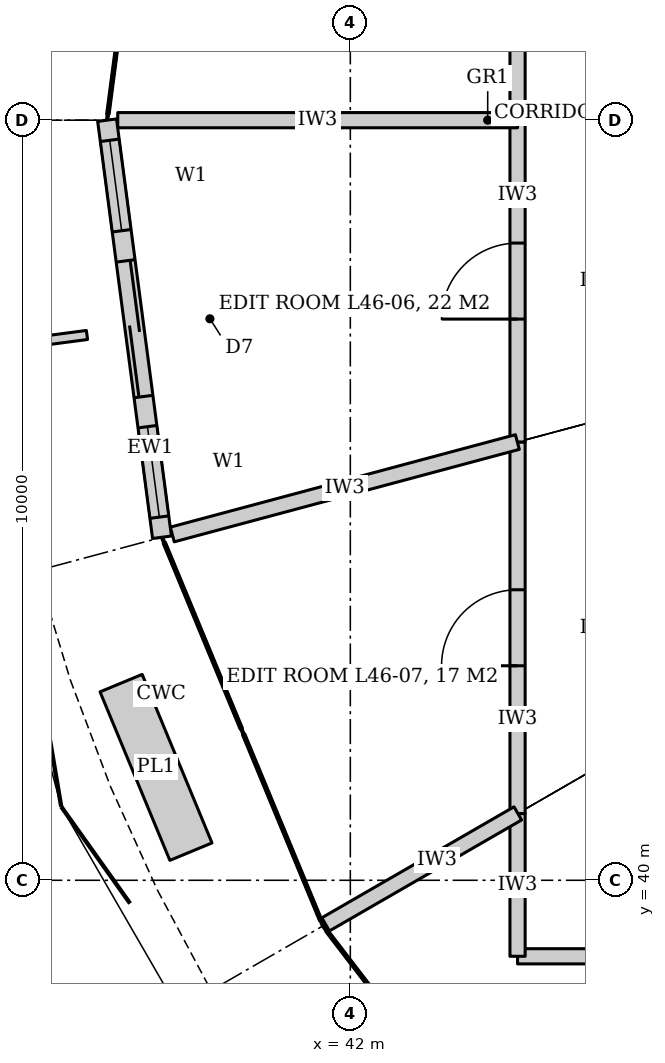
"""IFC4 building model, lengths in metres.
Left out: names, types, materials, properties, quantities, classifications, styles, units other than length and angle.
Written with IfcOpenShell. Run it as: python <this file> out.ifc"""

import sys

from ifc_helpers import new_model, si_unit, direction, frame, frame_2d, origin, place, context, subcontext, project, spatial, rectangle, extrude, element, fill, save


model = new_model("IFC4")
c1 = context("Model", 3, precision=1e-05, world=origin(), true_north=direction((0.0, 1.0)))
c2 = subcontext(c1, "Body", "Model", "MODEL_VIEW")
j1 = project(units=[si_unit("LENGTHUNIT", "METRE"), si_unit("PLANEANGLEUNIT", "RADIAN")], contexts=[c1])
p1 = place(None, origin())
s1 = spatial("IfcSite", under=j1, at=p1, CompositionType="ELEMENT")
p2 = place(p1, origin())
s2 = spatial("IfcBuilding", under=s1, at=p2, CompositionType="ELEMENT")
p3 = place(p2, frame((0.0, 0.0, 202.4)))
s3 = spatial("IfcBuildingStorey", under=s2, at=p3, CompositionType="ELEMENT", Elevation=202.4)
p4 = place(p3, frame((47.0, 39.0, 0.0), z_axis=(0.0, 0.0, 1.0), x_axis=(-1.0, 0.0, 0.0)))
e1 = element("IfcWall", 1, at=p4, inside=s3, PredefinedType="PARTITIONING", context=c2, shape_type="SweptSolid", body=[
    extrude(rectangle(XDim=2.8, YDim=0.2, at=frame_2d((1.4, 0.0))), origin(), (0.0, 0.0, 1.0), 3.04),
])
p5 = place(p3, frame((44.2, 39.0, 0.0), z_axis=(0.0, 0.0, 1.0), x_axis=(0.0, 1.0, 0.0)))
e2 = element("IfcWall", 2, at=p5, inside=s3, PredefinedType="PARTITIONING", context=c2, shape_type="SweptSolid", body=[
    extrude(rectangle(XDim=1.878, YDim=0.2, at=frame_2d((0.939, 0.0))), origin(), (0.0, 0.0, 1.0), 3.012),
])
p6 = place(p3, frame((44.2, 40.878, 0.0), z_axis=(0.0, 0.0, 1.0), x_axis=(0.0, 1.0, 0.0)))
e3 = element("IfcWall", 3, at=p6, inside=s3, PredefinedType="PARTITIONING", context=c2, shape_type="SweptSolid", body=[
    extrude(rectangle(XDim=4.888, YDim=0.2, at=frame_2d((2.444, 0.0))), origin(), (0.0, 0.0, 1.0), 3.012),
])
p7 = place(p6, frame((1.944, 0.0, 0.0)))
e4 = element("IfcOpeningElement", 4, at=p7, cuts=e3, PredefinedType="OPENING", context=c2, shape_type="SweptSolid", body=[
    extrude(rectangle(XDim=1.0, YDim=2.1, at=frame_2d((0.5, 1.05))), frame((0.0, 0.11, 0.0), z_axis=(0.0, -1.0, 0.0), x_axis=(1.0, 0.0, 0.0)), (0.0, 0.0, 1.0), 0.22),
])
p8 = place(p3, frame((44.2, 45.766, 0.0), z_axis=(0.0, 0.0, 1.0), x_axis=(0.0, 1.0, 0.0)))
e5 = element("IfcWall", 5, at=p8, inside=s3, PredefinedType="PARTITIONING", context=c2, shape_type="SweptSolid", body=[
    extrude(rectangle(XDim=4.234, YDim=0.2, at=frame_2d((2.117, 0.0))), origin(), (0.0, 0.0, 1.0), 3.012),
])
p9 = place(p8, frame((1.617, 0.0, 0.0)))
e6 = element("IfcOpeningElement", 6, at=p9, cuts=e5, PredefinedType="OPENING", context=c2, shape_type="SweptSolid", body=[
    extrude(rectangle(XDim=1.0, YDim=2.1, at=frame_2d((0.5, 1.05))), frame((0.0, 0.11, 0.0), z_axis=(0.0, -1.0, 0.0), x_axis=(1.0, 0.0, 0.0)), (0.0, 0.0, 1.0), 0.22),
])
p10 = place(p3, frame((44.2, 50.0, 0.0), z_axis=(0.0, 0.0, 1.0), x_axis=(0.0, 1.0, 0.0)))
e7 = element("IfcWall", 7, at=p10, inside=s3, PredefinedType="PARTITIONING", context=c2, shape_type="SweptSolid", body=[
    extrude(rectangle(XDim=4.234, YDim=0.2, at=frame_2d((2.117, 0.0))), origin(), (0.0, 0.0, 1.0), 3.012),
])
p11 = place(p10, frame((1.617, 0.0, 0.0)))
e8 = element("IfcOpeningElement", 8, at=p11, cuts=e7, PredefinedType="OPENING", context=c2, shape_type="SweptSolid", body=[
    extrude(rectangle(XDim=1.0, YDim=2.1, at=frame_2d((0.5, 1.05))), frame((0.0, 0.11, 0.0), z_axis=(0.0, -1.0, 0.0), x_axis=(1.0, 0.0, 0.0)), (0.0, 0.0, 1.0), 0.22),
])
p12 = place(p3, frame((44.2, 50.0, 0.0), z_axis=(0.0, 0.0, 1.0), x_axis=(-1.0, 0.0, 0.0)))
e9 = element("IfcWall", 9, at=p12, inside=s3, PredefinedType="PARTITIONING", context=c2, shape_type="SweptSolid", body=[
    extrude(rectangle(XDim=5.26, YDim=0.2, at=frame_2d((2.63, 0.0))), origin(), (0.0, 0.0, 1.0), 3.012),
])
p13 = place(p3, frame((44.198, 45.766, 0.0), z_axis=(0.0, 0.0, 1.0), x_axis=(-0.96593251702, -0.258794073665, 0.0)))
e10 = element("IfcWall", 10, at=p13, inside=s3, PredefinedType="PARTITIONING", context=c2, shape_type="SweptSolid", body=[
    extrude(rectangle(XDim=4.7, YDim=0.2, at=frame_2d((2.35, 0.0))), origin(), (0.0, 0.0, 1.0), 3.012),
])
p14 = place(p3, frame((44.204, 40.88, 0.0), z_axis=(0.0, 0.0, 1.0), x_axis=(-0.866032430508, -0.49998782916, 0.0)))
e11 = element("IfcWall", 11, at=p14, inside=s3, PredefinedType="PARTITIONING", context=c2, shape_type="SweptSolid", body=[
    extrude(rectangle(XDim=2.92, YDim=0.2, at=frame_2d((1.46, 0.0))), origin(), (0.0, 0.0, 1.0), 3.012),
])
p15 = place(p3, frame((38.8, 50.0, 0.0), z_axis=(0.0, 0.0, 1.0), x_axis=(0.130530967061, -0.991444232742, 0.0)))
e12 = element("IfcWall", 12, at=p15, inside=s3, PredefinedType="SOLIDWALL", context=c2, shape_type="SweptSolid", body=[
    extrude(rectangle(XDim=5.534, YDim=0.25, at=frame_2d((2.767, 0.0))), origin(), (0.0, 0.0, 1.0), 4.04),
])
p16 = place(p15, frame((1.867, 0.0, 0.0)))
e13 = element("IfcOpeningElement", 13, at=p16, cuts=e12, PredefinedType="OPENING", context=c2, shape_type="SweptSolid", body=[
    extrude(rectangle(XDim=1.8, YDim=2.4, at=frame_2d((0.9, 1.2))), frame((0.0, 0.135, 0.0), z_axis=(0.0, -1.0, 0.0), x_axis=(1.0, 0.0, 0.0)), (0.0, 0.0, 1.0), 0.27),
])
p17 = place(p15, frame((0.267, 0.0, 0.0)))
e14 = element("IfcOpeningElement", 14, at=p17, cuts=e12, PredefinedType="OPENING", context=c2, shape_type="SweptSolid", body=[
    extrude(rectangle(XDim=1.2, YDim=2.4, at=frame_2d((0.6, 1.2))), frame((0.0, 0.135, 0.0), z_axis=(0.0, -1.0, 0.0), x_axis=(1.0, 0.0, 0.0)), (0.0, 0.0, 1.0), 0.27),
])
p18 = place(p15, frame((4.067, 0.0, 0.0)))
e15 = element("IfcOpeningElement", 15, at=p18, cuts=e12, PredefinedType="OPENING", context=c2, shape_type="SweptSolid", body=[
    extrude(rectangle(XDim=1.2, YDim=2.4, at=frame_2d((0.6, 1.2))), frame((0.0, 0.135, 0.0), z_axis=(0.0, -1.0, 0.0), x_axis=(1.0, 0.0, 0.0)), (0.0, 0.0, 1.0), 0.27),
])
p19 = place(p9, origin())
e16 = element("IfcDoor", 16, at=p19, inside=s3, OperationType="SINGLE_SWING_LEFT", PredefinedType="DOOR", context=c2, shape_type="SweptSolid", body=[
    extrude(rectangle(XDim=1.0, YDim=2.1, at=frame_2d((0.5, 1.05))), frame((0.0, 0.025, 0.0), z_axis=(0.0, -1.0, 0.0), x_axis=(1.0, 0.0, 0.0)), (0.0, 0.0, 1.0), 0.05),
])
fill(e6, e16)
p20 = place(p7, origin())
e17 = element("IfcDoor", 17, at=p20, inside=s3, OperationType="SINGLE_SWING_LEFT", PredefinedType="DOOR", context=c2, shape_type="SweptSolid", body=[
    extrude(rectangle(XDim=1.0, YDim=2.1, at=frame_2d((0.5, 1.05))), frame((0.0, 0.025, 0.0), z_axis=(0.0, -1.0, 0.0), x_axis=(1.0, 0.0, 0.0)), (0.0, 0.0, 1.0), 0.05),
])
fill(e4, e17)
p21 = place(p16, origin())
e18 = element("IfcDoor", 18, at=p21, inside=s3, OperationType="DOUBLE_DOOR_SLIDING", PredefinedType="DOOR", context=c2, shape_type="SweptSolid", body=[
    extrude(rectangle(XDim=1.8, YDim=2.4, at=frame_2d((0.9, 1.2))), frame((0.0, 0.025, 0.0), z_axis=(0.0, -1.0, 0.0), x_axis=(1.0, 0.0, 0.0)), (0.0, 0.0, 1.0), 0.05),
])
fill(e13, e18)
p22 = place(p17, origin())
e19 = element("IfcWindow", 19, at=p22, inside=s3, PartitioningType="SINGLE_PANEL", PredefinedType="WINDOW", context=c2, shape_type="SweptSolid", body=[
    extrude(rectangle(XDim=1.2, YDim=2.4, at=frame_2d((0.6, 1.2))), frame((0.0, 0.03, 0.0), z_axis=(0.0, -1.0, 0.0), x_axis=(1.0, 0.0, 0.0)), (0.0, 0.0, 1.0), 0.06),
])
fill(e14, e19)
p23 = place(p18, origin())
e20 = element("IfcWindow", 20, at=p23, inside=s3, PartitioningType="SINGLE_PANEL", PredefinedType="WINDOW", context=c2, shape_type="SweptSolid", body=[
    extrude(rectangle(XDim=1.2, YDim=2.4, at=frame_2d((0.6, 1.2))), frame((0.0, 0.03, 0.0), z_axis=(0.0, -1.0, 0.0), x_axis=(1.0, 0.0, 0.0)), (0.0, 0.0, 1.0), 0.06),
])
fill(e15, e20)
save(model, sys.argv[1])
